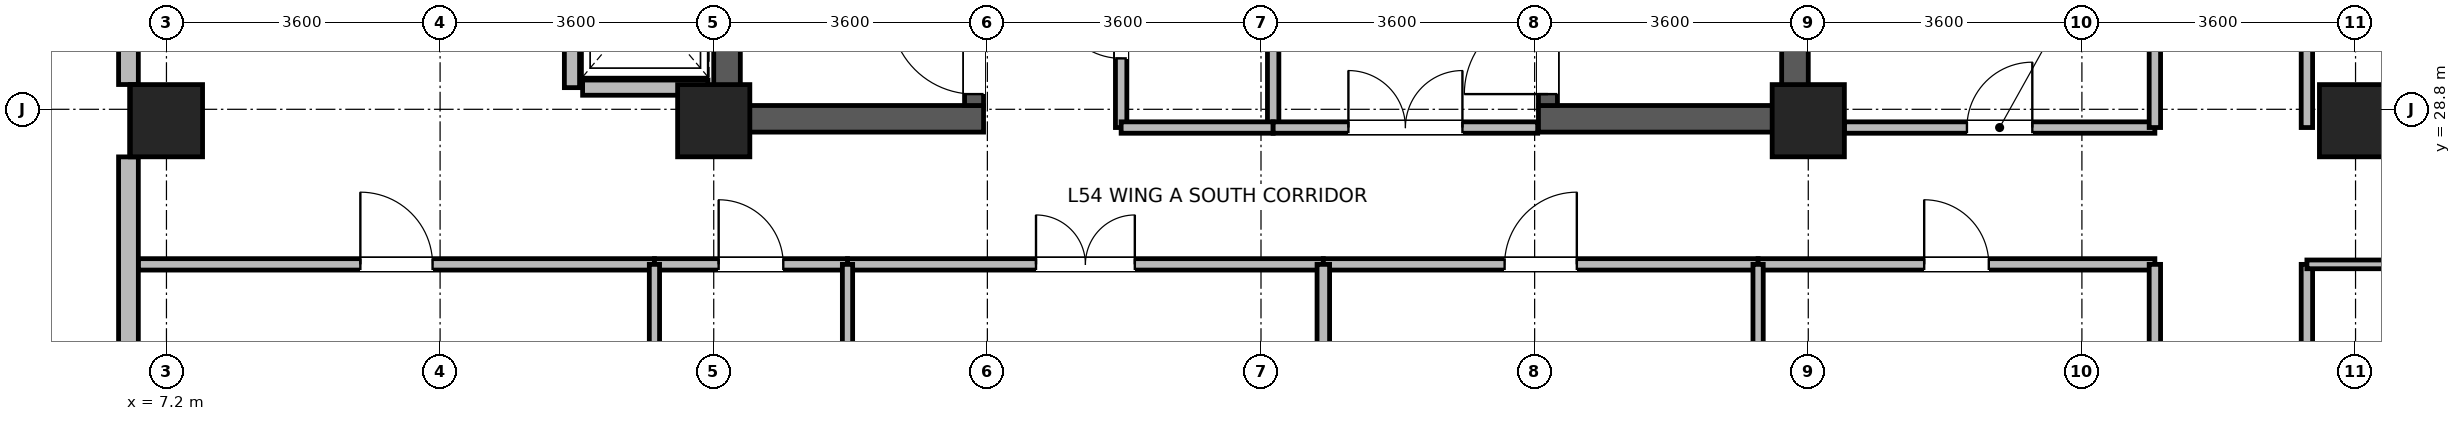
"""IFC4 building model, lengths in metres.
Left out: names, types, materials, properties, quantities, classifications, styles, units other than length and angle.
Written with IfcOpenShell. Run it as: python <this file> out.ifc"""

import sys

from ifc_helpers import new_model, si_unit, direction, frame, frame_2d, origin, origin_2d, place, context, subcontext, project, spatial, rectangle, extrude, source, transform, mapped, element, fill, save


model = new_model("IFC4")
c1 = context("Model", 3, precision=1e-05, world=origin(), true_north=direction((0.0, 1.0)))
c2 = subcontext(c1, "Body", "Model", "MODEL_VIEW")
j1 = project(units=[si_unit("LENGTHUNIT", "METRE"), si_unit("PLANEANGLEUNIT", "RADIAN")], contexts=[c1])
p1 = place(None, origin())
s1 = spatial("IfcSite", under=j1, at=p1, CompositionType="ELEMENT")
p2 = place(p1, origin())
s2 = spatial("IfcBuilding", under=s1, at=p2, CompositionType="ELEMENT")
p3 = place(p2, frame((0.0, 0.0, 212.9)))
s3 = spatial("IfcBuildingStorey", under=s2, at=p3, CompositionType="ELEMENT", Elevation=212.9)
for number, where, z_axis, x_axis in (
    (1, (14.575, 28.5, 0.0), (0.0, 0.0, 1.0), (0.0, 1.0, 0.0)),
    (2, (28.625, 28.5, 0.0), (0.0, 0.0, 1.0), (0.0, 1.0, 0.0)),
):
    element("IfcWall", number, at=place(p3, frame(where, z_axis=z_axis, x_axis=x_axis)), inside=s3, PredefinedType="SHEAR", context=c2, shape_type="SweptSolid", body=[
        extrude(rectangle(XDim=7.7, YDim=0.35, at=frame_2d((3.85, 0.0))), origin(), (0.0, 0.0, 1.0), 3.47),
    ])
for number, where, z_axis, x_axis in (
    (3, (14.75, 28.675, 0.0), (0.0, 0.0, 1.0), (1.0, 0.0, 0.0)),
    (4, (25.25, 28.675, 0.0), (0.0, 0.0, 1.0), (1.0, 0.0, 0.0)),
):
    element("IfcWall", number, at=place(p3, frame(where, z_axis=z_axis, x_axis=x_axis)), inside=s3, PredefinedType="SHEAR", context=c2, shape_type="SweptSolid", body=[
        extrude(rectangle(XDim=3.2, YDim=0.35, at=frame_2d((1.6, 0.0))), origin(), (0.0, 0.0, 1.0), 3.47),
    ])
p4 = place(p3, frame((17.825, 28.85, 0.0), z_axis=(0.0, 0.0, 1.0), x_axis=(0.0, 1.0, 0.0)))
e5 = element("IfcWall", 5, at=p4, inside=s3, PredefinedType="SHEAR", context=c2, shape_type="SweptSolid", body=[
    extrude(rectangle(XDim=7.0, YDim=0.25, at=frame_2d((3.5, 0.0))), origin(), (0.0, 0.0, 1.0), 3.47),
])
p5 = place(p4, frame((0.15, 0.0, 0.0)))
e6 = element("IfcOpeningElement", 6, at=p5, cuts=e5, PredefinedType="OPENING", context=c2, shape_type="SweptSolid", body=[
    extrude(rectangle(XDim=1.1, YDim=2.08, at=frame_2d((0.55, 1.04))), frame((0.0, 0.135, 0.0), z_axis=(0.0, -1.0, 0.0), x_axis=(1.0, 0.0, 0.0)), (0.0, 0.0, 1.0), 0.27),
])
p6 = place(p3, frame((25.375, 28.85, 0.0), z_axis=(0.0, 0.0, 1.0), x_axis=(0.0, 1.0, 0.0)))
e7 = element("IfcWall", 7, at=p6, inside=s3, PredefinedType="SHEAR", context=c2, shape_type="SweptSolid", body=[
    extrude(rectangle(XDim=7.0, YDim=0.25, at=frame_2d((3.5, 0.0))), origin(), (0.0, 0.0, 1.0), 3.47),
])
p7 = place(p6, frame((0.15, 0.0, 0.0)))
e8 = element("IfcOpeningElement", 8, at=p7, cuts=e7, PredefinedType="OPENING", context=c2, shape_type="SweptSolid", body=[
    extrude(rectangle(XDim=1.1, YDim=2.08, at=frame_2d((0.55, 1.04))), frame((0.0, 0.135, 0.0), z_axis=(0.0, -1.0, 0.0), x_axis=(1.0, 0.0, 0.0)), (0.0, 0.0, 1.0), 0.27),
])
m1 = source(origin(), c2, "Body", "SweptSolid", [
    extrude(rectangle(XDim=0.95, YDim=0.95, at=origin_2d()), origin(), (0.0, 0.0, 1.0), 3.7),
])
for number, where, z_axis, x_axis in (
    (9, (7.2, 28.65, 0.0), (0.0, 0.0, 1.0), (1.0, 0.0, 0.0)),
    (10, (14.4, 28.65, 0.0), (0.0, 0.0, 1.0), (1.0, 0.0, 0.0)),
    (11, (28.8, 28.65, 0.0), (0.0, 0.0, 1.0), (1.0, 0.0, 0.0)),
    (12, (36.0, 28.65, 0.0), (0.0, 0.0, 1.0), (1.0, 0.0, 0.0)),
):
    element("IfcColumn", number, at=place(p3, frame(where, z_axis=z_axis, x_axis=x_axis)), inside=s3, PredefinedType="COLUMN", context=c2, shape_type="MappedRepresentation", body=[
        mapped(m1, transform((0.0, 0.0, 0.0), x_axis=(1.0, 0.0, 0.0), y_axis=(0.0, 1.0, 0.0), z_axis=(0.0, 0.0, 1.0), scale=1.0)),
    ])
p8 = place(p3, frame((6.7, 29.126, 0.0), z_axis=(0.0, 0.0, 1.0), x_axis=(0.0, 1.0, 0.0)))
e13 = element("IfcWall", 13, at=p8, inside=s3, PredefinedType="STANDARD", context=c2, shape_type="SweptSolid", body=[
    extrude(rectangle(XDim=6.548, YDim=0.26, at=frame_2d((3.274, 0.0))), origin(), (0.0, 0.0, 1.0), 3.45),
])
p9 = place(p8, frame((0.737, 0.0, 0.85)))
e14 = element("IfcOpeningElement", 14, at=p9, cuts=e13, PredefinedType="OPENING", context=c2, shape_type="SweptSolid", body=[
    extrude(rectangle(XDim=1.8, YDim=1.85, at=frame_2d((0.9, 0.925))), frame((0.0, 0.14, 0.0), z_axis=(0.0, -1.0, 0.0), x_axis=(1.0, 0.0, 0.0)), (0.0, 0.0, 1.0), 0.28),
])
p10 = place(p8, frame((4.011, 0.0, 0.85)))
e15 = element("IfcOpeningElement", 15, at=p10, cuts=e13, PredefinedType="OPENING", context=c2, shape_type="SweptSolid", body=[
    extrude(rectangle(XDim=1.8, YDim=1.85, at=frame_2d((0.9, 0.925))), frame((0.0, 0.14, 0.0), z_axis=(0.0, -1.0, 0.0), x_axis=(1.0, 0.0, 0.0)), (0.0, 0.0, 1.0), 0.28),
])
p11 = place(p3, frame((6.7, 21.47, 0.0), z_axis=(0.0, 0.0, 1.0), x_axis=(0.0, 1.0, 0.0)))
e16 = element("IfcWall", 16, at=p11, inside=s3, PredefinedType="STANDARD", context=c2, shape_type="SweptSolid", body=[
    extrude(rectangle(XDim=6.704, YDim=0.26, at=frame_2d((3.352, 0.0))), origin(), (0.0, 0.0, 1.0), 3.45),
])
p12 = place(p11, frame((2.877, 0.0, 0.85)))
e17 = element("IfcOpeningElement", 17, at=p12, cuts=e16, PredefinedType="OPENING", context=c2, shape_type="SweptSolid", body=[
    extrude(rectangle(XDim=0.95, YDim=1.75, at=frame_2d((0.475, 0.875))), frame((0.0, 0.14, 0.0), z_axis=(0.0, -1.0, 0.0), x_axis=(1.0, 0.0, 0.0)), (0.0, 0.0, 1.0), 0.28),
])
p13 = place(p3, frame((12.675, 29.085, 0.0), z_axis=(0.0, 0.0, 1.0), x_axis=(1.0, 0.0, 0.0)))
e18 = element("IfcWall", 18, at=p13, inside=s3, PredefinedType="PARTITIONING", context=c2, shape_type="SweptSolid", body=[
    extrude(rectangle(XDim=1.65, YDim=0.2, at=frame_2d((0.825, 0.0))), origin(), (0.0, 0.0, 1.0), 3.45),
])
p14 = place(p3, frame((12.535, 29.085, 0.0), z_axis=(0.0, 0.0, 1.0), x_axis=(0.0, 1.0, 0.0)))
e19 = element("IfcWall", 19, at=p14, inside=s3, PredefinedType="PARTITIONING", context=c2, shape_type="SweptSolid", body=[
    extrude(rectangle(XDim=2.23, YDim=0.2, at=frame_2d((1.115, 0.0))), origin(), (0.0, 0.0, 1.0), 3.45),
])
p15 = place(p3, frame((35.36, 16.96, 0.0), z_axis=(0.0, 0.0, 1.0), x_axis=(0.0, 1.0, 0.0)))
e20 = element("IfcWall", 20, at=p15, inside=s3, PredefinedType="PARTITIONING", context=c2, shape_type="SweptSolid", body=[
    extrude(rectangle(XDim=9.8, YDim=0.15, at=frame_2d((4.9, 0.0))), origin(), (0.0, 0.0, 1.0), 3.45),
])
p16 = place(p15, frame((2.486, 0.0, 0.0)))
e21 = element("IfcOpeningElement", 21, at=p16, cuts=e20, PredefinedType="OPENING", context=c2, shape_type="SweptSolid", body=[
    extrude(rectangle(XDim=1.3, YDim=2.12, at=frame_2d((0.65, 1.06))), frame((0.0, 0.085, 0.0), z_axis=(0.0, -1.0, 0.0), x_axis=(1.0, 0.0, 0.0)), (0.0, 0.0, 1.0), 0.17),
])
p17 = place(p3, frame((35.36, 28.56, 0.0), z_axis=(0.0, 0.0, 1.0), x_axis=(0.0, 1.0, 0.0)))
e22 = element("IfcWall", 22, at=p17, inside=s3, PredefinedType="PARTITIONING", context=c2, shape_type="SweptSolid", body=[
    extrude(rectangle(XDim=7.68, YDim=0.15, at=frame_2d((3.84, 0.0))), origin(), (0.0, 0.0, 1.0), 3.45),
])
p18 = place(p17, frame((3.19, 0.0, 0.0)))
e23 = element("IfcOpeningElement", 23, at=p18, cuts=e22, PredefinedType="OPENING", context=c2, shape_type="SweptSolid", body=[
    extrude(rectangle(XDim=1.3, YDim=2.12, at=frame_2d((0.65, 1.06))), frame((0.0, 0.085, 0.0), z_axis=(0.0, -1.0, 0.0), x_axis=(1.0, 0.0, 0.0)), (0.0, 0.0, 1.0), 0.17),
])
p19 = place(p3, frame((6.832, 26.76, 0.0), z_axis=(0.0, 0.0, 1.0), x_axis=(1.0, 0.0, 0.0)))
e24 = element("IfcWall", 24, at=p19, inside=s3, PredefinedType="PARTITIONING", context=c2, shape_type="SweptSolid", body=[
    extrude(rectangle(XDim=6.788, YDim=0.15, at=frame_2d((3.394, 0.0))), origin(), (0.0, 0.0, 1.0), 3.45),
])
p20 = place(p19, frame((2.919, 0.0, 0.0)))
e25 = element("IfcOpeningElement", 25, at=p20, cuts=e24, PredefinedType="OPENING", context=c2, shape_type="SweptSolid", body=[
    extrude(rectangle(XDim=0.95, YDim=2.1, at=frame_2d((0.475, 1.05))), frame((0.0, 0.085, 0.0), z_axis=(0.0, -1.0, 0.0), x_axis=(1.0, 0.0, 0.0)), (0.0, 0.0, 1.0), 0.17),
])
p21 = place(p3, frame((16.16, 26.76, 0.0), z_axis=(0.0, 0.0, 1.0), x_axis=(1.0, 0.0, 0.0)))
e26 = element("IfcWall", 26, at=p21, inside=s3, PredefinedType="PARTITIONING", context=c2, shape_type="SweptSolid", body=[
    extrude(rectangle(XDim=6.26, YDim=0.15, at=frame_2d((3.13, 0.0))), origin(), (0.0, 0.0, 1.0), 3.45),
])
p22 = place(p21, frame((2.48, 0.0, 0.0)))
e27 = element("IfcOpeningElement", 27, at=p22, cuts=e26, PredefinedType="OPENING", context=c2, shape_type="SweptSolid", body=[
    extrude(rectangle(XDim=1.3, YDim=2.12, at=frame_2d((0.65, 1.06))), frame((0.0, 0.085, 0.0), z_axis=(0.0, -1.0, 0.0), x_axis=(1.0, 0.0, 0.0)), (0.0, 0.0, 1.0), 0.17),
])
p23 = place(p3, frame((22.42, 26.76, 0.0), z_axis=(0.0, 0.0, 1.0), x_axis=(1.0, 0.0, 0.0)))
e28 = element("IfcWall", 28, at=p23, inside=s3, PredefinedType="PARTITIONING", context=c2, shape_type="SweptSolid", body=[
    extrude(rectangle(XDim=5.72, YDim=0.15, at=frame_2d((2.86, 0.0))), origin(), (0.0, 0.0, 1.0), 3.45),
])
p24 = place(p23, frame((2.385, 0.0, 0.0)))
e29 = element("IfcOpeningElement", 29, at=p24, cuts=e28, PredefinedType="OPENING", context=c2, shape_type="SweptSolid", body=[
    extrude(rectangle(XDim=0.95, YDim=2.1, at=frame_2d((0.475, 1.05))), frame((0.0, 0.085, 0.0), z_axis=(0.0, -1.0, 0.0), x_axis=(1.0, 0.0, 0.0)), (0.0, 0.0, 1.0), 0.17),
])
p25 = place(p3, frame((28.14, 26.76, 0.0), z_axis=(0.0, 0.0, 1.0), x_axis=(1.0, 0.0, 0.0)))
e30 = element("IfcWall", 30, at=p25, inside=s3, PredefinedType="PARTITIONING", context=c2, shape_type="SweptSolid", body=[
    extrude(rectangle(XDim=5.22, YDim=0.15, at=frame_2d((2.61, 0.0))), origin(), (0.0, 0.0, 1.0), 3.45),
])
p26 = place(p25, frame((2.185, 0.0, 0.0)))
e31 = element("IfcOpeningElement", 31, at=p26, cuts=e30, PredefinedType="OPENING", context=c2, shape_type="SweptSolid", body=[
    extrude(rectangle(XDim=0.85, YDim=2.04, at=frame_2d((0.425, 1.02))), frame((0.0, 0.085, 0.0), z_axis=(0.0, -1.0, 0.0), x_axis=(1.0, 0.0, 0.0)), (0.0, 0.0, 1.0), 0.17),
])
p27 = place(p3, frame((33.36, 21.6, 0.0), z_axis=(0.0, 0.0, 1.0), x_axis=(0.0, 1.0, 0.0)))
e32 = element("IfcWall", 32, at=p27, inside=s3, PredefinedType="PARTITIONING", context=c2, shape_type="SweptSolid", body=[
    extrude(rectangle(XDim=5.16, YDim=0.15, at=frame_2d((2.58, 0.0))), origin(), (0.0, 0.0, 1.0), 3.45),
])
p28 = place(p3, frame((29.275, 28.56, 0.0), z_axis=(0.0, 0.0, 1.0), x_axis=(1.0, 0.0, 0.0)))
e33 = element("IfcWall", 33, at=p28, inside=s3, PredefinedType="PARTITIONING", context=c2, shape_type="SweptSolid", body=[
    extrude(rectangle(XDim=4.085, YDim=0.15, at=frame_2d((2.042, 0.0))), origin(), (0.0, 0.0, 1.0), 2.9),
])
p29 = place(p28, frame((1.613, 0.0, 0.0)))
e34 = element("IfcOpeningElement", 34, at=p29, cuts=e33, PredefinedType="OPENING", context=c2, shape_type="SweptSolid", body=[
    extrude(rectangle(XDim=0.86, YDim=2.02, at=frame_2d((0.43, 1.01))), frame((0.0, 0.085, 0.0), z_axis=(0.0, -1.0, 0.0), x_axis=(1.0, 0.0, 0.0)), (0.0, 0.0, 1.0), 0.17),
])
p30 = place(p3, frame((33.36, 28.56, 0.0), z_axis=(0.0, 0.0, 1.0), x_axis=(0.0, 1.0, 0.0)))
e35 = element("IfcWall", 35, at=p30, inside=s3, PredefinedType="PARTITIONING", context=c2, shape_type="SweptSolid", body=[
    extrude(rectangle(XDim=3.08, YDim=0.15, at=frame_2d((1.54, 0.0))), origin(), (0.0, 0.0, 1.0), 3.45),
])
p31 = place(p3, frame((19.76, 28.56, 0.0), z_axis=(0.0, 0.0, 1.0), x_axis=(0.0, 1.0, 0.0)))
e36 = element("IfcWall", 36, at=p31, inside=s3, PredefinedType="PARTITIONING", context=c2, shape_type="SweptSolid", body=[
    extrude(rectangle(XDim=2.68, YDim=0.15, at=frame_2d((1.34, 0.0))), origin(), (0.0, 0.0, 1.0), 3.45),
])
p32 = place(p31, frame((0.91, 0.0, 0.0)))
e37 = element("IfcOpeningElement", 37, at=p32, cuts=e36, PredefinedType="OPENING", context=c2, shape_type="SweptSolid", body=[
    extrude(rectangle(XDim=0.86, YDim=2.02, at=frame_2d((0.43, 1.01))), frame((0.0, 0.085, 0.0), z_axis=(0.0, -1.0, 0.0), x_axis=(1.0, 0.0, 0.0)), (0.0, 0.0, 1.0), 0.17),
])
p33 = place(p3, frame((21.76, 28.56, 0.0), z_axis=(0.0, 0.0, 1.0), x_axis=(0.0, 1.0, 0.0)))
e38 = element("IfcWall", 38, at=p33, inside=s3, PredefinedType="PARTITIONING", context=c2, shape_type="SweptSolid", body=[
    extrude(rectangle(XDim=2.68, YDim=0.15, at=frame_2d((1.34, 0.0))), origin(), (0.0, 0.0, 1.0), 3.45),
])
p34 = place(p3, frame((13.62, 26.76, 0.0), z_axis=(0.0, 0.0, 1.0), x_axis=(1.0, 0.0, 0.0)))
e39 = element("IfcWall", 39, at=p34, inside=s3, PredefinedType="PARTITIONING", context=c2, shape_type="SweptSolid", body=[
    extrude(rectangle(XDim=2.54, YDim=0.15, at=frame_2d((1.27, 0.0))), origin(), (0.0, 0.0, 1.0), 3.45),
])
p35 = place(p34, frame((0.845, 0.0, 0.0)))
e40 = element("IfcOpeningElement", 40, at=p35, cuts=e39, PredefinedType="OPENING", context=c2, shape_type="SweptSolid", body=[
    extrude(rectangle(XDim=0.85, YDim=2.04, at=frame_2d((0.425, 1.02))), frame((0.0, 0.085, 0.0), z_axis=(0.0, -1.0, 0.0), x_axis=(1.0, 0.0, 0.0)), (0.0, 0.0, 1.0), 0.17),
])
p36 = place(p3, frame((19.76, 28.56, 0.0), z_axis=(0.0, 0.0, 1.0), x_axis=(1.0, 0.0, 0.0)))
e41 = element("IfcWall", 41, at=p36, inside=s3, PredefinedType="PARTITIONING", context=c2, shape_type="SweptSolid", body=[
    extrude(rectangle(XDim=2.0, YDim=0.15, at=frame_2d((1.0, 0.0))), origin(), (0.0, 0.0, 1.0), 2.55),
])
p37 = place(p3, frame((35.36, 26.76, 0.0), z_axis=(0.0, 0.0, 1.0), x_axis=(1.0, 0.0, 0.0)))
e42 = element("IfcWall", 42, at=p37, inside=s3, PredefinedType="PARTITIONING", context=c2, shape_type="SweptSolid", body=[
    extrude(rectangle(XDim=7.06, YDim=0.115, at=frame_2d((3.53, 0.0))), origin(), (0.0, 0.0, 1.0), 3.45),
])
for number, where, z_axis, x_axis in (
    (43, (13.62, 21.732, 0.0), (0.0, 0.0, 1.0), (0.0, 1.0, 0.0)),
    (44, (16.16, 21.732, 0.0), (0.0, 0.0, 1.0), (0.0, 1.0, 0.0)),
):
    element("IfcWall", number, at=place(p3, frame(where, z_axis=z_axis, x_axis=x_axis)), inside=s3, PredefinedType="PARTITIONING", context=c2, shape_type="SweptSolid", body=[
        extrude(rectangle(XDim=5.028, YDim=0.135, at=frame_2d((2.514, 0.0))), origin(), (0.0, 0.0, 1.0), 3.45),
    ])
p38 = place(p3, frame((22.42, 21.732, 0.0), z_axis=(0.0, 0.0, 1.0), x_axis=(0.0, 1.0, 0.0)))
e45 = element("IfcWall", 45, at=p38, inside=s3, PredefinedType="PARTITIONING", context=c2, shape_type="SweptSolid", body=[
    extrude(rectangle(XDim=5.028, YDim=0.165, at=frame_2d((2.514, 0.0))), origin(), (0.0, 0.0, 1.0), 3.45),
])
p39 = place(p3, frame((28.14, 21.732, 0.0), z_axis=(0.0, 0.0, 1.0), x_axis=(0.0, 1.0, 0.0)))
e46 = element("IfcWall", 46, at=p39, inside=s3, PredefinedType="PARTITIONING", context=c2, shape_type="SweptSolid", body=[
    extrude(rectangle(XDim=5.028, YDim=0.135, at=frame_2d((2.514, 0.0))), origin(), (0.0, 0.0, 1.0), 3.45),
])
p40 = place(p3, frame((21.76, 28.56, 0.0), z_axis=(0.0, 0.0, 1.0), x_axis=(1.0, 0.0, 0.0)))
e47 = element("IfcWall", 47, at=p40, inside=s3, PredefinedType="PARTITIONING", context=c2, shape_type="SweptSolid", body=[
    extrude(rectangle(XDim=3.48, YDim=0.15, at=frame_2d((1.74, 0.0))), origin(), (0.0, 0.0, 1.0), 2.55),
])
p41 = place(p40, frame((0.99, 0.0, 0.0)))
e48 = element("IfcOpeningElement", 48, at=p41, cuts=e47, PredefinedType="OPENING", context=c2, shape_type="SweptSolid", body=[
    extrude(rectangle(XDim=1.5, YDim=2.1, at=frame_2d((0.75, 1.05))), frame((0.0, 0.085, 0.0), z_axis=(0.0, -1.0, 0.0), x_axis=(1.0, 0.0, 0.0)), (0.0, 0.0, 1.0), 0.17),
])
p42 = place(p5, origin())
e49 = element("IfcDoor", 49, at=p42, inside=s3, OperationType="SINGLE_SWING_RIGHT", PredefinedType="DOOR", context=c2, shape_type="SweptSolid", body=[
    extrude(rectangle(XDim=1.1, YDim=2.08, at=frame_2d((0.55, 1.04))), frame((0.0, 0.025, 0.0), z_axis=(0.0, -1.0, 0.0), x_axis=(1.0, 0.0, 0.0)), (0.0, 0.0, 1.0), 0.05),
])
fill(e6, e49)
p43 = place(p7, origin())
e50 = element("IfcDoor", 50, at=p43, inside=s3, OperationType="SINGLE_SWING_LEFT", PredefinedType="DOOR", context=c2, shape_type="SweptSolid", body=[
    extrude(rectangle(XDim=1.1, YDim=2.08, at=frame_2d((0.55, 1.04))), frame((0.0, 0.025, 0.0), z_axis=(0.0, -1.0, 0.0), x_axis=(1.0, 0.0, 0.0)), (0.0, 0.0, 1.0), 0.05),
])
fill(e8, e50)
p44 = place(p20, origin())
e51 = element("IfcDoor", 51, at=p44, inside=s3, OperationType="SINGLE_SWING_LEFT", PredefinedType="DOOR", context=c2, shape_type="SweptSolid", body=[
    extrude(rectangle(XDim=0.95, YDim=2.1, at=frame_2d((0.475, 1.05))), frame((0.0, 0.025, 0.0), z_axis=(0.0, -1.0, 0.0), x_axis=(1.0, 0.0, 0.0)), (0.0, 0.0, 1.0), 0.05),
])
fill(e25, e51)
p45 = place(p22, origin())
e52 = element("IfcDoor", 52, at=p45, inside=s3, OperationType="DOUBLE_DOOR_SINGLE_SWING", PredefinedType="DOOR", context=c2, shape_type="SweptSolid", body=[
    extrude(rectangle(XDim=1.3, YDim=2.12, at=frame_2d((0.65, 1.06))), frame((0.0, 0.025, 0.0), z_axis=(0.0, -1.0, 0.0), x_axis=(1.0, 0.0, 0.0)), (0.0, 0.0, 1.0), 0.05),
])
fill(e27, e52)
p46 = place(p24, origin())
e53 = element("IfcDoor", 53, at=p46, inside=s3, OperationType="SINGLE_SWING_RIGHT", PredefinedType="DOOR", context=c2, shape_type="SweptSolid", body=[
    extrude(rectangle(XDim=0.95, YDim=2.1, at=frame_2d((0.475, 1.05))), frame((0.0, 0.025, 0.0), z_axis=(0.0, -1.0, 0.0), x_axis=(1.0, 0.0, 0.0)), (0.0, 0.0, 1.0), 0.05),
])
fill(e29, e53)
p47 = place(p26, origin())
e54 = element("IfcDoor", 54, at=p47, inside=s3, OperationType="SINGLE_SWING_LEFT", PredefinedType="DOOR", context=c2, shape_type="SweptSolid", body=[
    extrude(rectangle(XDim=0.85, YDim=2.04, at=frame_2d((0.425, 1.02))), frame((0.0, 0.025, 0.0), z_axis=(0.0, -1.0, 0.0), x_axis=(1.0, 0.0, 0.0)), (0.0, 0.0, 1.0), 0.05),
])
fill(e31, e54)
p48 = place(p29, origin())
e55 = element("IfcDoor", 55, at=p48, inside=s3, OperationType="SINGLE_SWING_RIGHT", PredefinedType="DOOR", context=c2, shape_type="SweptSolid", body=[
    extrude(rectangle(XDim=0.86, YDim=2.02, at=frame_2d((0.43, 1.01))), frame((0.0, 0.025, 0.0), z_axis=(0.0, -1.0, 0.0), x_axis=(1.0, 0.0, 0.0)), (0.0, 0.0, 1.0), 0.05),
])
fill(e34, e55)
p49 = place(p32, origin())
e56 = element("IfcDoor", 56, at=p49, inside=s3, OperationType="SINGLE_SWING_RIGHT", PredefinedType="DOOR", context=c2, shape_type="SweptSolid", body=[
    extrude(rectangle(XDim=0.86, YDim=2.02, at=frame_2d((0.43, 1.01))), frame((0.0, 0.025, 0.0), z_axis=(0.0, -1.0, 0.0), x_axis=(1.0, 0.0, 0.0)), (0.0, 0.0, 1.0), 0.05),
])
fill(e37, e56)
p50 = place(p35, origin())
e57 = element("IfcDoor", 57, at=p50, inside=s3, OperationType="SINGLE_SWING_LEFT", PredefinedType="DOOR", context=c2, shape_type="SweptSolid", body=[
    extrude(rectangle(XDim=0.85, YDim=2.04, at=frame_2d((0.425, 1.02))), frame((0.0, 0.025, 0.0), z_axis=(0.0, -1.0, 0.0), x_axis=(1.0, 0.0, 0.0)), (0.0, 0.0, 1.0), 0.05),
])
fill(e40, e57)
p51 = place(p41, origin())
e58 = element("IfcDoor", 58, at=p51, inside=s3, OperationType="DOUBLE_DOOR_SINGLE_SWING", PredefinedType="DOOR", context=c2, shape_type="SweptSolid", body=[
    extrude(rectangle(XDim=1.5, YDim=2.1, at=frame_2d((0.75, 1.05))), frame((0.0, 0.025, 0.0), z_axis=(0.0, -1.0, 0.0), x_axis=(1.0, 0.0, 0.0)), (0.0, 0.0, 1.0), 0.05),
])
fill(e48, e58)
save(model, sys.argv[1])
